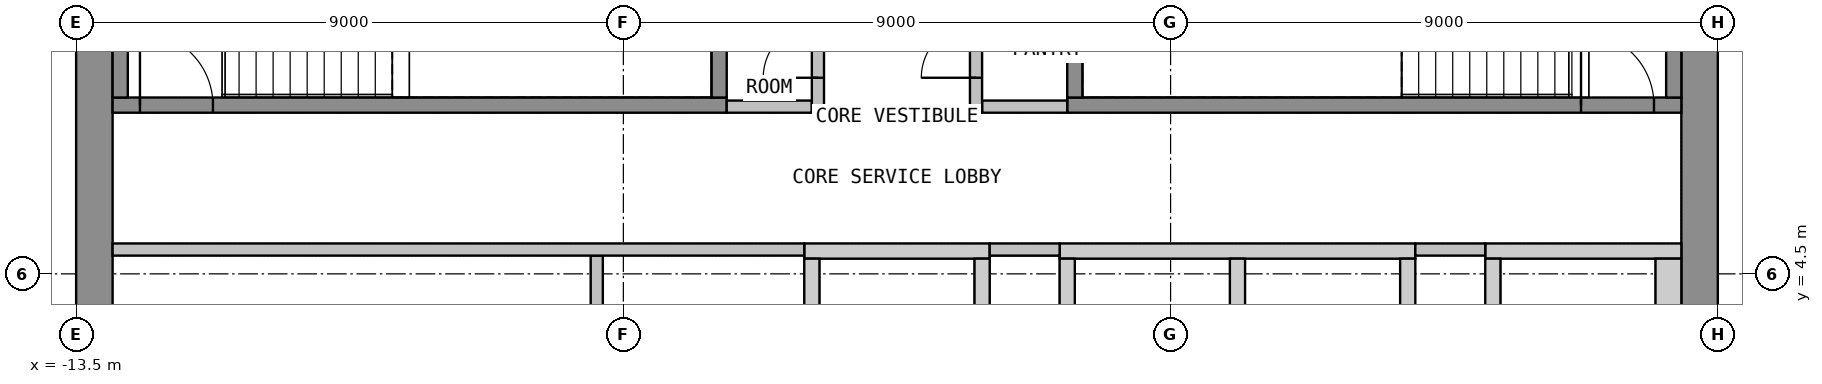
"""IFC4 building model, lengths in metres.
Left out: names, types, materials, properties, quantities, classifications, styles, units other than length and angle.
Written with IfcOpenShell. Run it as: python <this file> out.ifc"""

import sys

from ifc_helpers import new_model, si_unit, direction, frame, frame_2d, origin, place, context, subcontext, project, spatial, polyline, rectangle, outline, extrude, element, fill, save


model = new_model("IFC4")
c1 = context("Model", 3, precision=1e-05, world=origin(), true_north=direction((0.0, 1.0)))
c2 = subcontext(c1, "Body", "Model", "MODEL_VIEW")
j1 = project(units=[si_unit("LENGTHUNIT", "METRE"), si_unit("PLANEANGLEUNIT", "RADIAN")], contexts=[c1])
p1 = place(None, origin())
s1 = spatial("IfcSite", under=j1, at=p1, CompositionType="ELEMENT")
p2 = place(p1, origin())
s2 = spatial("IfcBuilding", under=s1, at=p2, CompositionType="ELEMENT")
p3 = place(p2, frame((0.0, 0.0, 235.2)))
s3 = spatial("IfcBuildingStorey", under=s2, at=p3, CompositionType="ELEMENT", Elevation=235.2)
p4 = place(p3, frame((-13.2, -10.65, 0.0), z_axis=(0.0, 0.0, 1.0), x_axis=(0.0, 1.0, 0.0)))
e1 = element("IfcWall", 1, at=p4, inside=s3, PredefinedType="SHEAR", context=c2, shape_type="SweptSolid", body=[
    extrude(rectangle(XDim=21.3, YDim=0.6, at=frame_2d((10.65, 0.0))), origin(), (0.0, 0.0, 1.0), 3.575),
])
p5 = place(p4, frame((9.45, 0.0, 0.0)))
e2 = element("IfcOpeningElement", 2, at=p5, cuts=e1, PredefinedType="OPENING", context=c2, shape_type="SweptSolid", body=[
    extrude(rectangle(XDim=2.4, YDim=2.1, at=frame_2d((1.2, 1.05))), frame((0.0, 0.31, 0.0), z_axis=(0.0, -1.0, 0.0), x_axis=(1.0, 0.0, 0.0)), (0.0, 0.0, 1.0), 0.62),
])
p6 = place(p3, frame((13.2, -10.65, 0.0), z_axis=(0.0, 0.0, 1.0), x_axis=(0.0, 1.0, 0.0)))
e3 = element("IfcWall", 3, at=p6, inside=s3, PredefinedType="SHEAR", context=c2, shape_type="SweptSolid", body=[
    extrude(rectangle(XDim=21.3, YDim=0.6, at=frame_2d((10.65, 0.0))), origin(), (0.0, 0.0, 1.0), 3.575),
])
p7 = place(p6, frame((9.45, 0.0, 0.0)))
e4 = element("IfcOpeningElement", 4, at=p7, cuts=e3, PredefinedType="OPENING", context=c2, shape_type="SweptSolid", body=[
    extrude(rectangle(XDim=2.4, YDim=2.1, at=frame_2d((1.2, 1.05))), frame((0.0, 0.31, 0.0), z_axis=(0.0, -1.0, 0.0), x_axis=(1.0, 0.0, 0.0)), (0.0, 0.0, 1.0), 0.62),
])
p8 = place(p3, origin())
e5 = element("IfcWall", 5, at=p8, inside=s3, PredefinedType="SHEAR", context=c2, shape_type="SweptSolid", body=[
    extrude(outline(polyline([(-1.525, 4.75), (1.525, 4.75), (1.525, 5.0), (-1.525, 5.0), (-1.525, 4.75)])), origin(), (0.0, 0.0, 1.0), 3.575),
])
p9 = place(p3, origin())
e6 = element("IfcWall", 6, at=p9, inside=s3, PredefinedType="SHEAR", context=c2, shape_type="SweptSolid", body=[
    extrude(outline(polyline([(2.675, 4.75), (8.525, 4.75), (8.525, 5.0), (2.675, 5.0), (2.675, 4.75)])), origin(), (0.0, 0.0, 1.0), 3.575),
])
p10 = place(p3, origin())
e7 = element("IfcWall", 7, at=p10, inside=s3, PredefinedType="SHEAR", context=c2, shape_type="SweptSolid", body=[
    extrude(outline(polyline([(9.675, 4.75), (12.9, 4.75), (12.9, 5.0), (9.675, 5.0), (9.675, 4.75)])), origin(), (0.0, 0.0, 1.0), 3.575),
])
p11 = place(p3, origin())
e8 = element("IfcWall", 8, at=p11, inside=s3, PredefinedType="SHEAR", context=c2, shape_type="SweptSolid", body=[
    extrude(outline(polyline([(-1.525, 2.05), (-1.275, 2.05), (-1.275, 4.75), (-1.525, 4.75), (-1.525, 2.05)])), origin(), (0.0, 0.0, 1.0), 3.575),
])
p12 = place(p3, origin())
e9 = element("IfcWall", 9, at=p12, inside=s3, PredefinedType="SHEAR", context=c2, shape_type="SweptSolid", body=[
    extrude(outline(polyline([(1.275, 2.05), (1.525, 2.05), (1.525, 4.75), (1.275, 4.75), (1.275, 2.05)])), origin(), (0.0, 0.0, 1.0), 3.575),
])
p13 = place(p3, origin())
e10 = element("IfcWall", 10, at=p13, inside=s3, PredefinedType="SHEAR", context=c2, shape_type="SweptSolid", body=[
    extrude(outline(polyline([(2.675, 2.05), (2.925, 2.05), (2.925, 4.75), (2.675, 4.75), (2.675, 2.05)])), origin(), (0.0, 0.0, 1.0), 3.575),
])
p14 = place(p3, origin())
e11 = element("IfcWall", 11, at=p14, inside=s3, PredefinedType="SHEAR", context=c2, shape_type="SweptSolid", body=[
    extrude(outline(polyline([(5.475, 2.05), (5.725, 2.05), (5.725, 4.75), (5.475, 4.75), (5.475, 2.05)])), origin(), (0.0, 0.0, 1.0), 3.575),
])
p15 = place(p3, origin())
e12 = element("IfcWall", 12, at=p15, inside=s3, PredefinedType="SHEAR", context=c2, shape_type="SweptSolid", body=[
    extrude(outline(polyline([(8.275, 2.05), (8.525, 2.05), (8.525, 4.75), (8.275, 4.75), (8.275, 2.05)])), origin(), (0.0, 0.0, 1.0), 3.575),
])
p16 = place(p3, origin())
e13 = element("IfcWall", 13, at=p16, inside=s3, PredefinedType="SHEAR", context=c2, shape_type="SweptSolid", body=[
    extrude(outline(polyline([(9.675, 2.05), (9.925, 2.05), (9.925, 4.75), (9.675, 4.75), (9.675, 2.05)])), origin(), (0.0, 0.0, 1.0), 3.575),
])
p17 = place(p3, origin())
e14 = element("IfcWall", 14, at=p17, inside=s3, PredefinedType="SHEAR", context=c2, shape_type="SweptSolid", body=[
    extrude(outline(polyline([(12.475, 2.05), (12.9, 2.05), (12.9, 4.75), (12.475, 4.75), (12.475, 2.05)])), origin(), (0.0, 0.0, 1.0), 3.575),
])
p18 = place(p3, frame((-12.9, 7.275, 0.0), z_axis=(0.0, 0.0, 1.0), x_axis=(1.0, 0.0, 0.0)))
e15 = element("IfcWall", 15, at=p18, inside=s3, PredefinedType="SHEAR", context=c2, shape_type="SweptSolid", body=[
    extrude(rectangle(XDim=10.1, YDim=0.25, at=frame_2d((5.05, 0.0))), origin(), (0.0, 0.0, 1.0), 3.575),
])
p19 = place(p18, frame((0.45, 0.0, 0.0)))
e16 = element("IfcOpeningElement", 16, at=p19, cuts=e15, PredefinedType="OPENING", context=c2, shape_type="SweptSolid", body=[
    extrude(rectangle(XDim=1.2, YDim=2.1, at=frame_2d((0.6, 1.05))), frame((0.0, 0.135, 0.0), z_axis=(0.0, -1.0, 0.0), x_axis=(1.0, 0.0, 0.0)), (0.0, 0.0, 1.0), 0.27),
])
for number, where, z_axis, x_axis in (
    (17, (-12.775, 7.4, 0.0), (0.0, 0.0, 1.0), (0.0, 1.0, 0.0)),
    (18, (-2.925, 7.4, 0.0), (0.0, 0.0, 1.0), (0.0, 1.0, 0.0)),
):
    element("IfcWall", number, at=place(p3, frame(where, z_axis=z_axis, x_axis=x_axis)), inside=s3, PredefinedType="SHEAR", context=c2, shape_type="SweptSolid", body=[
        extrude(rectangle(XDim=3.25, YDim=0.25, at=frame_2d((1.625, 0.0))), origin(), (0.0, 0.0, 1.0), 3.575),
    ])
p20 = place(p3, frame((2.8, 7.275, 0.0), z_axis=(0.0, 0.0, 1.0), x_axis=(1.0, 0.0, 0.0)))
e19 = element("IfcWall", 19, at=p20, inside=s3, PredefinedType="SHEAR", context=c2, shape_type="SweptSolid", body=[
    extrude(rectangle(XDim=10.1, YDim=0.25, at=frame_2d((5.05, 0.0))), origin(), (0.0, 0.0, 1.0), 3.575),
])
p21 = place(p20, frame((8.45, 0.0, 0.0)))
e20 = element("IfcOpeningElement", 20, at=p21, cuts=e19, PredefinedType="OPENING", context=c2, shape_type="SweptSolid", body=[
    extrude(rectangle(XDim=1.2, YDim=2.1, at=frame_2d((0.6, 1.05))), frame((0.0, 0.135, 0.0), z_axis=(0.0, -1.0, 0.0), x_axis=(1.0, 0.0, 0.0)), (0.0, 0.0, 1.0), 0.27),
])
for number, where, z_axis, x_axis in (
    (21, (2.925, 7.4, 0.0), (0.0, 0.0, 1.0), (0.0, 1.0, 0.0)),
    (22, (12.775, 7.4, 0.0), (0.0, 0.0, 1.0), (0.0, 1.0, 0.0)),
):
    element("IfcWall", number, at=place(p3, frame(where, z_axis=z_axis, x_axis=x_axis)), inside=s3, PredefinedType="SHEAR", context=c2, shape_type="SweptSolid", body=[
        extrude(rectangle(XDim=3.25, YDim=0.25, at=frame_2d((1.625, 0.0))), origin(), (0.0, 0.0, 1.0), 3.575),
    ])
for number, where, z_axis, x_axis in (
    (23, (-2.8, 7.25, 0.0), (0.0, 0.0, 1.0), (1.0, 0.0, 0.0)),
    (24, (1.4, 7.25, 0.0), (0.0, 0.0, 1.0), (1.0, 0.0, 0.0)),
):
    element("IfcWall", number, at=place(p3, frame(where, z_axis=z_axis, x_axis=x_axis)), inside=s3, PredefinedType="PARTITIONING", context=c2, shape_type="SweptSolid", body=[
        extrude(rectangle(XDim=1.4, YDim=0.2, at=frame_2d((0.7, 0.0))), origin(), (0.0, 0.0, 1.0), 3.575),
    ])
p22 = place(p3, frame((-1.3, 7.15, 0.0), z_axis=(0.0, 0.0, 1.0), x_axis=(0.0, 1.0, 0.0)))
e25 = element("IfcWall", 25, at=p22, inside=s3, PredefinedType="PARTITIONING", context=c2, shape_type="SweptSolid", body=[
    extrude(rectangle(XDim=3.5, YDim=0.2, at=frame_2d((1.75, 0.0))), origin(), (0.0, 0.0, 1.0), 3.575),
])
p23 = place(p22, frame((0.575, 0.0, 0.0)))
e26 = element("IfcOpeningElement", 26, at=p23, cuts=e25, PredefinedType="OPENING", context=c2, shape_type="SweptSolid", body=[
    extrude(rectangle(XDim=0.9, YDim=2.1, at=frame_2d((0.45, 1.05))), frame((0.0, 0.11, 0.0), z_axis=(0.0, -1.0, 0.0), x_axis=(1.0, 0.0, 0.0)), (0.0, 0.0, 1.0), 0.22),
])
p24 = place(p22, frame((2.225, 0.0, 0.0)))
e27 = element("IfcOpeningElement", 27, at=p24, cuts=e25, PredefinedType="OPENING", context=c2, shape_type="SweptSolid", body=[
    extrude(rectangle(XDim=0.9, YDim=2.1, at=frame_2d((0.45, 1.05))), frame((0.0, 0.11, 0.0), z_axis=(0.0, -1.0, 0.0), x_axis=(1.0, 0.0, 0.0)), (0.0, 0.0, 1.0), 0.22),
])
p25 = place(p3, frame((1.3, 7.15, 0.0), z_axis=(0.0, 0.0, 1.0), x_axis=(0.0, 1.0, 0.0)))
e28 = element("IfcWall", 28, at=p25, inside=s3, PredefinedType="PARTITIONING", context=c2, shape_type="SweptSolid", body=[
    extrude(rectangle(XDim=3.5, YDim=0.2, at=frame_2d((1.75, 0.0))), origin(), (0.0, 0.0, 1.0), 3.575),
])
p26 = place(p25, frame((0.575, 0.0, 0.0)))
e29 = element("IfcOpeningElement", 29, at=p26, cuts=e28, PredefinedType="OPENING", context=c2, shape_type="SweptSolid", body=[
    extrude(rectangle(XDim=0.9, YDim=2.1, at=frame_2d((0.45, 1.05))), frame((0.0, 0.11, 0.0), z_axis=(0.0, -1.0, 0.0), x_axis=(1.0, 0.0, 0.0)), (0.0, 0.0, 1.0), 0.22),
])
p27 = place(p25, frame((2.225, 0.0, 0.0)))
e30 = element("IfcOpeningElement", 30, at=p27, cuts=e28, PredefinedType="OPENING", context=c2, shape_type="SweptSolid", body=[
    extrude(rectangle(XDim=0.9, YDim=2.1, at=frame_2d((0.45, 1.05))), frame((0.0, 0.11, 0.0), z_axis=(0.0, -1.0, 0.0), x_axis=(1.0, 0.0, 0.0)), (0.0, 0.0, 1.0), 0.22),
])
p28 = place(p3, frame((-4.938, 2.0, 0.0), z_axis=(0.0, 0.0, 1.0), x_axis=(0.0, 1.0, 0.0)))
e31 = element("IfcWall", 31, at=p28, inside=s3, PredefinedType="PARTITIONING", context=c2, shape_type="SweptSolid", body=[
    extrude(rectangle(XDim=2.8, YDim=0.2, at=frame_2d((1.4, 0.0))), origin(), (0.0, 0.0, 1.0), 3.575),
])
p29 = place(p3, frame((-12.9, 4.9, 0.0), z_axis=(0.0, 0.0, 1.0), x_axis=(1.0, 0.0, 0.0)))
e32 = element("IfcWall", 32, at=p29, inside=s3, PredefinedType="PARTITIONING", context=c2, shape_type="SweptSolid", body=[
    extrude(rectangle(XDim=11.375, YDim=0.2, at=frame_2d((5.688, 0.0))), origin(), (0.0, 0.0, 1.0), 3.575),
])
for number, where, z_axis, x_axis in (
    (33, (1.525, 4.9, 0.0), (0.0, 0.0, 1.0), (1.0, 0.0, 0.0)),
    (34, (8.525, 4.9, 0.0), (0.0, 0.0, 1.0), (1.0, 0.0, 0.0)),
):
    element("IfcWall", number, at=place(p3, frame(where, z_axis=z_axis, x_axis=x_axis)), inside=s3, PredefinedType="PARTITIONING", context=c2, shape_type="SweptSolid", body=[
        extrude(rectangle(XDim=1.15, YDim=0.2, at=frame_2d((0.575, 0.0))), origin(), (0.0, 0.0, 1.0), 3.575),
    ])
p30 = place(p19, origin())
e35 = element("IfcDoor", 35, at=p30, inside=s3, OperationType="SINGLE_SWING_LEFT", PredefinedType="DOOR", context=c2, shape_type="SweptSolid", body=[
    extrude(rectangle(XDim=1.2, YDim=2.1, at=frame_2d((0.6, 1.05))), frame((0.0, 0.025, 0.0), z_axis=(0.0, -1.0, 0.0), x_axis=(1.0, 0.0, 0.0)), (0.0, 0.0, 1.0), 0.05),
])
fill(e16, e35)
p31 = place(p21, origin())
e36 = element("IfcDoor", 36, at=p31, inside=s3, OperationType="SINGLE_SWING_LEFT", PredefinedType="DOOR", context=c2, shape_type="SweptSolid", body=[
    extrude(rectangle(XDim=1.2, YDim=2.1, at=frame_2d((0.6, 1.05))), frame((0.0, 0.025, 0.0), z_axis=(0.0, -1.0, 0.0), x_axis=(1.0, 0.0, 0.0)), (0.0, 0.0, 1.0), 0.05),
])
fill(e20, e36)
p32 = place(p23, origin())
e37 = element("IfcDoor", 37, at=p32, inside=s3, OperationType="SINGLE_SWING_LEFT", PredefinedType="DOOR", context=c2, shape_type="SweptSolid", body=[
    extrude(rectangle(XDim=0.9, YDim=2.1, at=frame_2d((0.45, 1.05))), frame((0.0, 0.025, 0.0), z_axis=(0.0, -1.0, 0.0), x_axis=(1.0, 0.0, 0.0)), (0.0, 0.0, 1.0), 0.05),
])
fill(e26, e37)
p33 = place(p26, origin())
e38 = element("IfcDoor", 38, at=p33, inside=s3, OperationType="SINGLE_SWING_LEFT", PredefinedType="DOOR", context=c2, shape_type="SweptSolid", body=[
    extrude(rectangle(XDim=0.9, YDim=2.1, at=frame_2d((0.45, 1.05))), frame((0.0, 0.025, 0.0), z_axis=(0.0, -1.0, 0.0), x_axis=(1.0, 0.0, 0.0)), (0.0, 0.0, 1.0), 0.05),
])
fill(e29, e38)
save(model, sys.argv[1])
